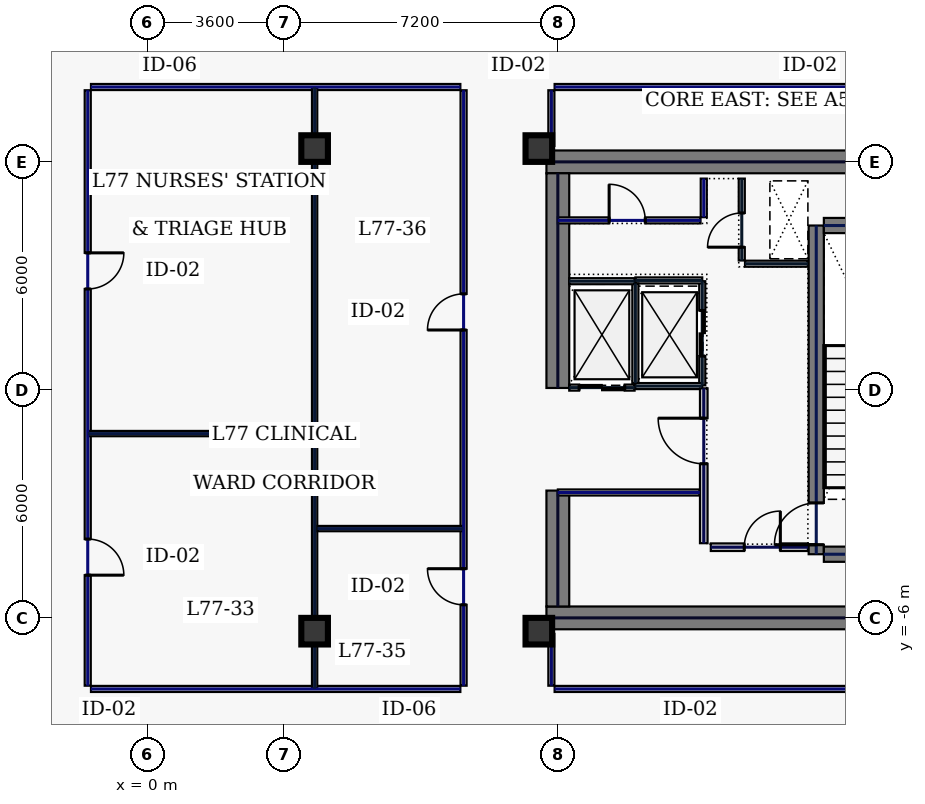
"""IFC4 building model, lengths in metres.
Left out: names, types, materials, properties, quantities, classifications, styles, units other than length and angle.
Written with IfcOpenShell. Run it as: python <this file> out.ifc"""

import sys

from ifc_helpers import new_model, si_unit, direction, frame, frame_2d, origin, origin_2d, place, context, subcontext, project, spatial, rectangle, hollow_rectangle, extrude, element, fill, save


model = new_model("IFC4")
c1 = context("Model", 3, precision=1e-05, world=origin(), true_north=direction((0.0, 1.0)))
c2 = subcontext(c1, "Body", "Model", "MODEL_VIEW")
j1 = project(units=[si_unit("LENGTHUNIT", "METRE"), si_unit("PLANEANGLEUNIT", "RADIAN")], contexts=[c1])
p1 = place(None, origin())
s1 = spatial("IfcSite", under=j1, at=p1, CompositionType="ELEMENT")
p2 = place(p1, origin())
s2 = spatial("IfcBuilding", under=s1, at=p2, CompositionType="ELEMENT")
p3 = place(p2, frame((0.0, 0.0, 329.0)))
s3 = spatial("IfcBuildingStorey", under=s2, at=p3, CompositionType="ELEMENT", Elevation=329.0)
for number, where, z_axis, x_axis in (
    (1, (10.5, 6.0, 0.0), (0.0, 0.0, 1.0), (1.0, 0.0, 0.0)),
    (2, (10.5, -6.0, 0.0), (0.0, 0.0, 1.0), (1.0, 0.0, 0.0)),
):
    element("IfcWall", number, at=place(p3, frame(where, z_axis=z_axis, x_axis=x_axis)), inside=s3, PredefinedType="SHEAR", context=c2, shape_type="SweptSolid", body=[
        extrude(rectangle(XDim=11.5, YDim=0.6, at=frame_2d((5.75, 0.0))), origin(), (0.0, 0.0, 1.0), 3.68),
    ])
p4 = place(p3, frame((10.8, -5.7, 0.0), z_axis=(0.0, 0.0, 1.0), x_axis=(0.0, 1.0, 0.0)))
e3 = element("IfcWall", 3, at=p4, inside=s3, PredefinedType="SHEAR", context=c2, shape_type="SweptSolid", body=[
    extrude(rectangle(XDim=3.05, YDim=0.6, at=frame_2d((1.525, 0.0))), origin(), (0.0, 0.0, 1.0), 3.68),
])
p5 = place(p3, frame((10.8, 0.05, 0.0), z_axis=(0.0, 0.0, 1.0), x_axis=(0.0, 1.0, 0.0)))
e4 = element("IfcWall", 4, at=p5, inside=s3, PredefinedType="SHEAR", context=c2, shape_type="SweptSolid", body=[
    extrude(rectangle(XDim=5.65, YDim=0.6, at=frame_2d((2.825, 0.0))), origin(), (0.0, 0.0, 1.0), 3.68),
])
p6 = place(p3, frame((17.6, -4.325, 0.0), z_axis=(0.0, 0.0, 1.0), x_axis=(0.0, 1.0, 0.0)))
e5 = element("IfcWall", 5, at=p6, inside=s3, PredefinedType="SHEAR", context=c2, shape_type="SweptSolid", body=[
    extrude(rectangle(XDim=8.65, YDim=0.4, at=frame_2d((4.325, 0.0))), origin(), (0.0, 0.0, 1.0), 3.68),
])
p7 = place(p6, frame((0.25, 0.0, 0.0)))
e6 = element("IfcOpeningElement", 6, at=p7, cuts=e5, PredefinedType="OPENING", context=c2, shape_type="SweptSolid", body=[
    extrude(rectangle(XDim=1.1, YDim=2.2, at=frame_2d((0.55, 1.1))), frame((0.0, 0.21, 0.0), z_axis=(0.0, -1.0, 0.0), x_axis=(1.0, 0.0, 0.0)), (0.0, 0.0, 1.0), 0.42),
])
for number, where, z_axis, x_axis in (
    (7, (17.8, -4.325, 0.0), (0.0, 0.0, 1.0), (1.0, 0.0, 0.0)),
    (8, (17.8, 4.325, 0.0), (0.0, 0.0, 1.0), (1.0, 0.0, 0.0)),
):
    element("IfcWall", number, at=place(p3, frame(where, z_axis=z_axis, x_axis=x_axis)), inside=s3, PredefinedType="SHEAR", context=c2, shape_type="SweptSolid", body=[
        extrude(rectangle(XDim=3.4, YDim=0.4, at=frame_2d((1.7, 0.0))), origin(), (0.0, 0.0, 1.0), 3.68),
    ])
for number, where, z_axis, x_axis in (
    (9, (10.3, -6.35, 0.0), (0.0, 0.0, 1.0), (1.0, 0.0, 0.0)),
    (10, (10.3, 6.35, 0.0), (0.0, 0.0, 1.0), (1.0, 0.0, 0.0)),
    (11, (4.4, -6.35, 0.0), (0.0, 0.0, 1.0), (1.0, 0.0, 0.0)),
    (12, (4.4, 6.35, 0.0), (0.0, 0.0, 1.0), (1.0, 0.0, 0.0)),
):
    element("IfcColumn", number, at=place(p3, frame(where, z_axis=z_axis, x_axis=x_axis)), inside=s3, PredefinedType="COLUMN", context=c2, shape_type="SweptSolid", body=[
        extrude(hollow_rectangle(XDim=0.7, YDim=0.7, WallThickness=0.032, at=origin_2d()), origin(), (0.0, 0.0, 1.0), 3.68),
    ])
p8 = place(p3, frame((14.6, 0.12, 0.0), z_axis=(0.0, 0.0, 1.0), x_axis=(0.0, 1.0, 0.0)))
e13 = element("IfcWall", 13, at=p8, inside=s3, PredefinedType="PARTITIONING", context=c2, shape_type="SweptSolid", body=[
    extrude(rectangle(XDim=2.74, YDim=0.16, at=frame_2d((1.37, 0.0))), origin(), (0.0, 0.0, 1.0), 3.68),
])
p9 = place(p8, frame((0.77, 0.0, 0.0)))
e14 = element("IfcOpeningElement", 14, at=p9, cuts=e13, PredefinedType="OPENING", context=c2, shape_type="SweptSolid", body=[
    extrude(rectangle(XDim=1.2, YDim=2.2, at=frame_2d((0.6, 1.1))), frame((0.0, 0.09, 0.0), z_axis=(0.0, -1.0, 0.0), x_axis=(1.0, 0.0, 0.0)), (0.0, 0.0, 1.0), 0.18),
])
for number, where, z_axis, x_axis in (
    (15, (12.84, 0.1, 0.0), (0.0, 0.0, 1.0), (1.0, 0.0, 0.0)),
    (16, (12.84, 2.88, 0.0), (0.0, 0.0, 1.0), (1.0, 0.0, 0.0)),
):
    element("IfcWall", number, at=place(p3, frame(where, z_axis=z_axis, x_axis=x_axis)), inside=s3, PredefinedType="PARTITIONING", context=c2, shape_type="SweptSolid", body=[
        extrude(rectangle(XDim=1.76, YDim=0.16, at=frame_2d((0.88, 0.0))), origin(), (0.0, 0.0, 1.0), 3.68),
    ])
p10 = place(p3, frame((12.84, 0.18, 0.0), z_axis=(0.0, 0.0, 1.0), x_axis=(0.0, 1.0, 0.0)))
e17 = element("IfcWall", 17, at=p10, inside=s3, PredefinedType="PARTITIONING", context=c2, shape_type="SweptSolid", body=[
    extrude(rectangle(XDim=2.62, YDim=0.16, at=frame_2d((1.31, 0.0))), origin(), (0.0, 0.0, 1.0), 3.68),
])
p11 = place(p3, frame((11.1, 0.06, 0.0), z_axis=(0.0, 0.0, 1.0), x_axis=(1.0, 0.0, 0.0)))
e18 = element("IfcWall", 18, at=p11, inside=s3, PredefinedType="PARTITIONING", context=c2, shape_type="SweptSolid", body=[
    extrude(rectangle(XDim=1.72, YDim=0.16, at=frame_2d((0.86, 0.0))), origin(), (0.0, 0.0, 1.0), 3.68),
])
p12 = place(p11, frame((0.26, 0.0, 0.0)))
e19 = element("IfcOpeningElement", 19, at=p12, cuts=e18, PredefinedType="OPENING", context=c2, shape_type="SweptSolid", body=[
    extrude(rectangle(XDim=1.2, YDim=2.2, at=frame_2d((0.6, 1.1))), frame((0.0, 0.09, 0.0), z_axis=(0.0, -1.0, 0.0), x_axis=(1.0, 0.0, 0.0)), (0.0, 0.0, 1.0), 0.18),
])
p13 = place(p3, frame((11.1, 2.86, 0.0), z_axis=(0.0, 0.0, 1.0), x_axis=(1.0, 0.0, 0.0)))
e20 = element("IfcWall", 20, at=p13, inside=s3, PredefinedType="PARTITIONING", context=c2, shape_type="SweptSolid", body=[
    extrude(rectangle(XDim=1.72, YDim=0.16, at=frame_2d((0.86, 0.0))), origin(), (0.0, 0.0, 1.0), 3.68),
])
p14 = place(p3, frame((15.64, 3.405, 0.0), z_axis=(0.0, 0.0, 1.0), x_axis=(0.0, 1.0, 0.0)))
e21 = element("IfcWall", 21, at=p14, inside=s3, PredefinedType="PARTITIONING", context=c2, shape_type="SweptSolid", body=[
    extrude(rectangle(XDim=2.155, YDim=0.16, at=frame_2d((1.078, 0.0))), origin(), (0.0, 0.0, 1.0), 3.68),
])
p15 = place(p14, frame((0.35, 0.0, 0.0)))
e22 = element("IfcOpeningElement", 22, at=p15, cuts=e21, PredefinedType="OPENING", context=c2, shape_type="SweptSolid", body=[
    extrude(rectangle(XDim=0.9, YDim=2.2, at=frame_2d((0.45, 1.1))), frame((0.0, 0.09, 0.0), z_axis=(0.0, -1.0, 0.0), x_axis=(1.0, 0.0, 0.0)), (0.0, 0.0, 1.0), 0.18),
])
p16 = place(p3, frame((15.725, 3.32, 0.0), z_axis=(0.0, 0.0, 1.0), x_axis=(1.0, 0.0, 0.0)))
e23 = element("IfcWall", 23, at=p16, inside=s3, PredefinedType="PARTITIONING", context=c2, shape_type="SweptSolid", body=[
    extrude(rectangle(XDim=1.655, YDim=0.16, at=frame_2d((0.827, 0.0))), origin(), (0.0, 0.0, 1.0), 3.68),
])
p17 = place(p3, frame((14.825, -4.14, 0.0), z_axis=(0.0, 0.0, 1.0), x_axis=(1.0, 0.0, 0.0)))
e24 = element("IfcWall", 24, at=p17, inside=s3, PredefinedType="SOLIDWALL", context=c2, shape_type="SweptSolid", body=[
    extrude(rectangle(XDim=2.555, YDim=0.2, at=frame_2d((1.277, 0.0))), origin(), (0.0, 0.0, 1.0), 3.68),
])
p18 = place(p17, frame((0.88, 0.0, 0.0)))
e25 = element("IfcOpeningElement", 25, at=p18, cuts=e24, PredefinedType="OPENING", context=c2, shape_type="SweptSolid", body=[
    extrude(rectangle(XDim=0.95, YDim=2.2, at=frame_2d((0.475, 1.1))), frame((0.0, 0.11, 0.0), z_axis=(0.0, -1.0, 0.0), x_axis=(1.0, 0.0, 0.0)), (0.0, 0.0, 1.0), 0.22),
])
p19 = place(p3, frame((10.8, -2.7, 0.0), z_axis=(0.0, 0.0, 1.0), x_axis=(1.0, 0.0, 0.0)))
e26 = element("IfcWall", 26, at=p19, inside=s3, PredefinedType="PARTITIONING", context=c2, shape_type="SweptSolid", body=[
    extrude(rectangle(XDim=3.735, YDim=0.16, at=frame_2d((1.867, 0.0))), origin(), (0.0, 0.0, 1.0), 3.68),
])
p20 = place(p3, frame((10.8, 4.46, 0.0), z_axis=(0.0, 0.0, 1.0), x_axis=(1.0, 0.0, 0.0)))
e27 = element("IfcWall", 27, at=p20, inside=s3, PredefinedType="PARTITIONING", context=c2, shape_type="SweptSolid", body=[
    extrude(rectangle(XDim=3.755, YDim=0.16, at=frame_2d((1.877, 0.0))), origin(), (0.0, 0.0, 1.0), 3.68),
])
p21 = place(p20, frame((1.35, 0.0, 0.0)))
e28 = element("IfcOpeningElement", 28, at=p21, cuts=e27, PredefinedType="OPENING", context=c2, shape_type="SweptSolid", body=[
    extrude(rectangle(XDim=0.95, YDim=2.2, at=frame_2d((0.475, 1.1))), frame((0.0, 0.09, 0.0), z_axis=(0.0, -1.0, 0.0), x_axis=(1.0, 0.0, 0.0)), (0.0, 0.0, 1.0), 0.18),
])
p22 = place(p3, frame((14.64, 4.545, 0.0), z_axis=(0.0, 0.0, 1.0), x_axis=(0.0, 1.0, 0.0)))
e29 = element("IfcWall", 29, at=p22, inside=s3, PredefinedType="PARTITIONING", context=c2, shape_type="SweptSolid", body=[
    extrude(rectangle(XDim=1.015, YDim=0.16, at=frame_2d((0.508, 0.0))), origin(), (0.0, 0.0, 1.0), 3.68),
])
p23 = place(p3, frame((14.64, -4.035, 0.0), z_axis=(0.0, 0.0, 1.0), x_axis=(0.0, 1.0, 0.0)))
e30 = element("IfcWall", 30, at=p23, inside=s3, PredefinedType="SOLIDWALL", context=c2, shape_type="SweptSolid", body=[
    extrude(rectangle(XDim=4.075, YDim=0.2, at=frame_2d((2.038, 0.0))), origin(), (0.0, 0.0, 1.0), 3.68),
])
p24 = place(p23, frame((2.09, 0.0, 0.0)))
e31 = element("IfcOpeningElement", 31, at=p24, cuts=e30, PredefinedType="OPENING", context=c2, shape_type="SweptSolid", body=[
    extrude(rectangle(XDim=1.2, YDim=2.2, at=frame_2d((0.6, 1.1))), frame((0.0, 0.11, 0.0), z_axis=(0.0, -1.0, 0.0), x_axis=(1.0, 0.0, 0.0)), (0.0, 0.0, 1.0), 0.22),
])
p25 = place(p3, frame((21.915, 7.97, 0.0), z_axis=(0.0, 0.0, 1.0), x_axis=(-1.0, 0.0, 0.0)))
e32 = element("IfcWall", 32, at=p25, inside=s3, PredefinedType="PARTITIONING", context=c2, shape_type="SweptSolid", body=[
    extrude(rectangle(XDim=11.2, YDim=0.16, at=frame_2d((5.6, 0.0))), origin(), (0.0, 0.0, 1.0), 3.68),
])
p26 = place(p3, frame((10.63, 7.885, 0.0), z_axis=(0.0, 0.0, 1.0), x_axis=(0.0, -1.0, 0.0)))
e33 = element("IfcWall", 33, at=p26, inside=s3, PredefinedType="PARTITIONING", context=c2, shape_type="SweptSolid", body=[
    extrude(rectangle(XDim=1.465, YDim=0.16, at=frame_2d((0.732, 0.0))), origin(), (0.0, 0.0, 1.0), 2.075),
])
p27 = place(p3, frame((10.63, -6.42, 0.0), z_axis=(0.0, 0.0, 1.0), x_axis=(0.0, -1.0, 0.0)))
e34 = element("IfcWall", 34, at=p27, inside=s3, PredefinedType="PARTITIONING", context=c2, shape_type="SweptSolid", body=[
    extrude(rectangle(XDim=1.365, YDim=0.16, at=frame_2d((0.683, 0.0))), origin(), (0.0, 0.0, 1.0), 2.075),
])
p28 = place(p3, frame((10.715, -7.87, 0.0), z_axis=(0.0, 0.0, 1.0), x_axis=(1.0, 0.0, 0.0)))
e35 = element("IfcWall", 35, at=p28, inside=s3, PredefinedType="PARTITIONING", context=c2, shape_type="SweptSolid", body=[
    extrude(rectangle(XDim=11.2, YDim=0.16, at=frame_2d((5.6, 0.0))), origin(), (0.0, 0.0, 1.0), 3.68),
])
p29 = place(p3, frame((8.235, 7.97, 0.0), z_axis=(0.0, 0.0, 1.0), x_axis=(-1.0, 0.0, 0.0)))
e36 = element("IfcWall", 36, at=p29, inside=s3, PredefinedType="PARTITIONING", context=c2, shape_type="SweptSolid", body=[
    extrude(rectangle(XDim=9.72, YDim=0.16, at=frame_2d((4.86, 0.0))), origin(), (0.0, 0.0, 1.0), 3.68),
])
p30 = place(p3, frame((-1.57, 7.885, 0.0), z_axis=(0.0, 0.0, 1.0), x_axis=(0.0, -1.0, 0.0)))
e37 = element("IfcWall", 37, at=p30, inside=s3, PredefinedType="PARTITIONING", context=c2, shape_type="SweptSolid", body=[
    extrude(rectangle(XDim=15.67, YDim=0.16, at=frame_2d((7.835, 0.0))), origin(), (0.0, 0.0, 1.0), 3.68),
])
p31 = place(p30, frame((11.811, 0.0, 0.0)))
e38 = element("IfcOpeningElement", 38, at=p31, cuts=e37, PredefinedType="OPENING", context=c2, shape_type="SweptSolid", body=[
    extrude(rectangle(XDim=0.95, YDim=2.2, at=frame_2d((0.475, 1.1))), frame((0.0, 0.09, 0.0), z_axis=(0.0, -1.0, 0.0), x_axis=(1.0, 0.0, 0.0)), (0.0, 0.0, 1.0), 0.18),
])
p32 = place(p30, frame((4.279, 0.0, 0.0)))
e39 = element("IfcOpeningElement", 39, at=p32, cuts=e37, PredefinedType="OPENING", context=c2, shape_type="SweptSolid", body=[
    extrude(rectangle(XDim=0.95, YDim=2.2, at=frame_2d((0.475, 1.1))), frame((0.0, 0.09, 0.0), z_axis=(0.0, -1.0, 0.0), x_axis=(1.0, 0.0, 0.0)), (0.0, 0.0, 1.0), 0.18),
])
p33 = place(p3, frame((-1.485, -7.87, 0.0), z_axis=(0.0, 0.0, 1.0), x_axis=(1.0, 0.0, 0.0)))
e40 = element("IfcWall", 40, at=p33, inside=s3, PredefinedType="PARTITIONING", context=c2, shape_type="SweptSolid", body=[
    extrude(rectangle(XDim=9.72, YDim=0.16, at=frame_2d((4.86, 0.0))), origin(), (0.0, 0.0, 1.0), 3.68),
])
p34 = place(p3, frame((8.32, -7.785, 0.0), z_axis=(0.0, 0.0, 1.0), x_axis=(0.0, 1.0, 0.0)))
e41 = element("IfcWall", 41, at=p34, inside=s3, PredefinedType="PARTITIONING", context=c2, shape_type="SweptSolid", body=[
    extrude(rectangle(XDim=15.67, YDim=0.16, at=frame_2d((7.835, 0.0))), origin(), (0.0, 0.0, 1.0), 3.68),
])
p35 = place(p34, frame((2.129, 0.0, 0.0)))
e42 = element("IfcOpeningElement", 42, at=p35, cuts=e41, PredefinedType="OPENING", context=c2, shape_type="SweptSolid", body=[
    extrude(rectangle(XDim=0.95, YDim=2.2, at=frame_2d((0.475, 1.1))), frame((0.0, 0.09, 0.0), z_axis=(0.0, -1.0, 0.0), x_axis=(1.0, 0.0, 0.0)), (0.0, 0.0, 1.0), 0.18),
])
p36 = place(p34, frame((9.361, 0.0, 0.0)))
e43 = element("IfcOpeningElement", 43, at=p36, cuts=e41, PredefinedType="OPENING", context=c2, shape_type="SweptSolid", body=[
    extrude(rectangle(XDim=0.95, YDim=2.2, at=frame_2d((0.475, 1.1))), frame((0.0, 0.09, 0.0), z_axis=(0.0, -1.0, 0.0), x_axis=(1.0, 0.0, 0.0)), (0.0, 0.0, 1.0), 0.18),
])
p37 = place(p3, frame((4.4, -7.865, 0.0), z_axis=(0.0, 0.0, 1.0), x_axis=(0.0, 1.0, 0.0)))
e44 = element("IfcWall", 44, at=p37, inside=s3, PredefinedType="PARTITIONING", context=c2, shape_type="SweptSolid", body=[
    extrude(rectangle(XDim=15.83, YDim=0.14, at=frame_2d((7.915, 0.0))), origin(), (0.0, 0.0, 1.0), 2.675),
])
p38 = place(p3, frame((-1.565, -1.15, 0.0), z_axis=(0.0, 0.0, 1.0), x_axis=(1.0, 0.0, 0.0)))
e45 = element("IfcWall", 45, at=p38, inside=s3, PredefinedType="PARTITIONING", context=c2, shape_type="SweptSolid", body=[
    extrude(rectangle(XDim=5.89, YDim=0.14, at=frame_2d((2.945, 0.0))), origin(), (0.0, 0.0, 1.0), 3.68),
])
p39 = place(p3, frame((4.475, -3.65, 0.0), z_axis=(0.0, 0.0, 1.0), x_axis=(1.0, 0.0, 0.0)))
e46 = element("IfcWall", 46, at=p39, inside=s3, PredefinedType="PARTITIONING", context=c2, shape_type="SweptSolid", body=[
    extrude(rectangle(XDim=3.84, YDim=0.14, at=frame_2d((1.92, 0.0))), origin(), (0.0, 0.0, 1.0), 3.68),
])
p40 = place(p7, origin())
e47 = element("IfcDoor", 47, at=p40, inside=s3, OperationType="SINGLE_SWING_LEFT", PredefinedType="DOOR", context=c2, shape_type="SweptSolid", body=[
    extrude(rectangle(XDim=1.1, YDim=2.2, at=frame_2d((0.55, 1.1))), frame((0.0, 0.025, 0.0), z_axis=(0.0, -1.0, 0.0), x_axis=(1.0, 0.0, 0.0)), (0.0, 0.0, 1.0), 0.05),
])
fill(e6, e47)
p41 = place(p9, origin())
e48 = element("IfcDoor", 48, at=p41, inside=s3, OperationType="SLIDING_TO_LEFT", PredefinedType="DOOR", context=c2, shape_type="SweptSolid", body=[
    extrude(rectangle(XDim=1.2, YDim=2.2, at=frame_2d((0.6, 1.1))), frame((0.0, 0.025, 0.0), z_axis=(0.0, -1.0, 0.0), x_axis=(1.0, 0.0, 0.0)), (0.0, 0.0, 1.0), 0.05),
])
fill(e14, e48)
p42 = place(p12, origin())
e49 = element("IfcDoor", 49, at=p42, inside=s3, OperationType="SLIDING_TO_LEFT", PredefinedType="DOOR", context=c2, shape_type="SweptSolid", body=[
    extrude(rectangle(XDim=1.2, YDim=2.2, at=frame_2d((0.6, 1.1))), frame((0.0, 0.025, 0.0), z_axis=(0.0, -1.0, 0.0), x_axis=(1.0, 0.0, 0.0)), (0.0, 0.0, 1.0), 0.05),
])
fill(e19, e49)
p43 = place(p15, origin())
e50 = element("IfcDoor", 50, at=p43, inside=s3, OperationType="SINGLE_SWING_LEFT", PredefinedType="DOOR", context=c2, shape_type="SweptSolid", body=[
    extrude(rectangle(XDim=0.9, YDim=2.2, at=frame_2d((0.45, 1.1))), frame((0.0, 0.025, 0.0), z_axis=(0.0, -1.0, 0.0), x_axis=(1.0, 0.0, 0.0)), (0.0, 0.0, 1.0), 0.05),
])
fill(e22, e50)
p44 = place(p18, origin())
e51 = element("IfcDoor", 51, at=p44, inside=s3, OperationType="SINGLE_SWING_RIGHT", PredefinedType="DOOR", context=c2, shape_type="SweptSolid", body=[
    extrude(rectangle(XDim=0.95, YDim=2.2, at=frame_2d((0.475, 1.1))), frame((0.0, 0.025, 0.0), z_axis=(0.0, -1.0, 0.0), x_axis=(1.0, 0.0, 0.0)), (0.0, 0.0, 1.0), 0.05),
])
fill(e25, e51)
p45 = place(p21, origin())
e52 = element("IfcDoor", 52, at=p45, inside=s3, OperationType="SINGLE_SWING_LEFT", PredefinedType="DOOR", context=c2, shape_type="SweptSolid", body=[
    extrude(rectangle(XDim=0.95, YDim=2.2, at=frame_2d((0.475, 1.1))), frame((0.0, 0.025, 0.0), z_axis=(0.0, -1.0, 0.0), x_axis=(1.0, 0.0, 0.0)), (0.0, 0.0, 1.0), 0.05),
])
fill(e28, e52)
p46 = place(p24, origin())
e53 = element("IfcDoor", 53, at=p46, inside=s3, OperationType="SINGLE_SWING_RIGHT", PredefinedType="DOOR", context=c2, shape_type="SweptSolid", body=[
    extrude(rectangle(XDim=1.2, YDim=2.2, at=frame_2d((0.6, 1.1))), frame((0.0, 0.025, 0.0), z_axis=(0.0, -1.0, 0.0), x_axis=(1.0, 0.0, 0.0)), (0.0, 0.0, 1.0), 0.05),
])
fill(e31, e53)
p47 = place(p31, origin())
e54 = element("IfcDoor", 54, at=p47, inside=s3, OperationType="SINGLE_SWING_RIGHT", PredefinedType="DOOR", context=c2, shape_type="SweptSolid", body=[
    extrude(rectangle(XDim=0.95, YDim=2.2, at=frame_2d((0.475, 1.1))), frame((0.0, 0.025, 0.0), z_axis=(0.0, -1.0, 0.0), x_axis=(1.0, 0.0, 0.0)), (0.0, 0.0, 1.0), 0.05),
])
fill(e38, e54)
p48 = place(p32, origin())
e55 = element("IfcDoor", 55, at=p48, inside=s3, OperationType="SINGLE_SWING_LEFT", PredefinedType="DOOR", context=c2, shape_type="SweptSolid", body=[
    extrude(rectangle(XDim=0.95, YDim=2.2, at=frame_2d((0.475, 1.1))), frame((0.0, 0.025, 0.0), z_axis=(0.0, -1.0, 0.0), x_axis=(1.0, 0.0, 0.0)), (0.0, 0.0, 1.0), 0.05),
])
fill(e39, e55)
p49 = place(p35, origin())
e56 = element("IfcDoor", 56, at=p49, inside=s3, OperationType="SINGLE_SWING_RIGHT", PredefinedType="DOOR", context=c2, shape_type="SweptSolid", body=[
    extrude(rectangle(XDim=0.95, YDim=2.2, at=frame_2d((0.475, 1.1))), frame((0.0, 0.025, 0.0), z_axis=(0.0, -1.0, 0.0), x_axis=(1.0, 0.0, 0.0)), (0.0, 0.0, 1.0), 0.05),
])
fill(e42, e56)
p50 = place(p36, origin())
e57 = element("IfcDoor", 57, at=p50, inside=s3, OperationType="SINGLE_SWING_LEFT", PredefinedType="DOOR", context=c2, shape_type="SweptSolid", body=[
    extrude(rectangle(XDim=0.95, YDim=2.2, at=frame_2d((0.475, 1.1))), frame((0.0, 0.025, 0.0), z_axis=(0.0, -1.0, 0.0), x_axis=(1.0, 0.0, 0.0)), (0.0, 0.0, 1.0), 0.05),
])
fill(e43, e57)
save(model, sys.argv[1])
